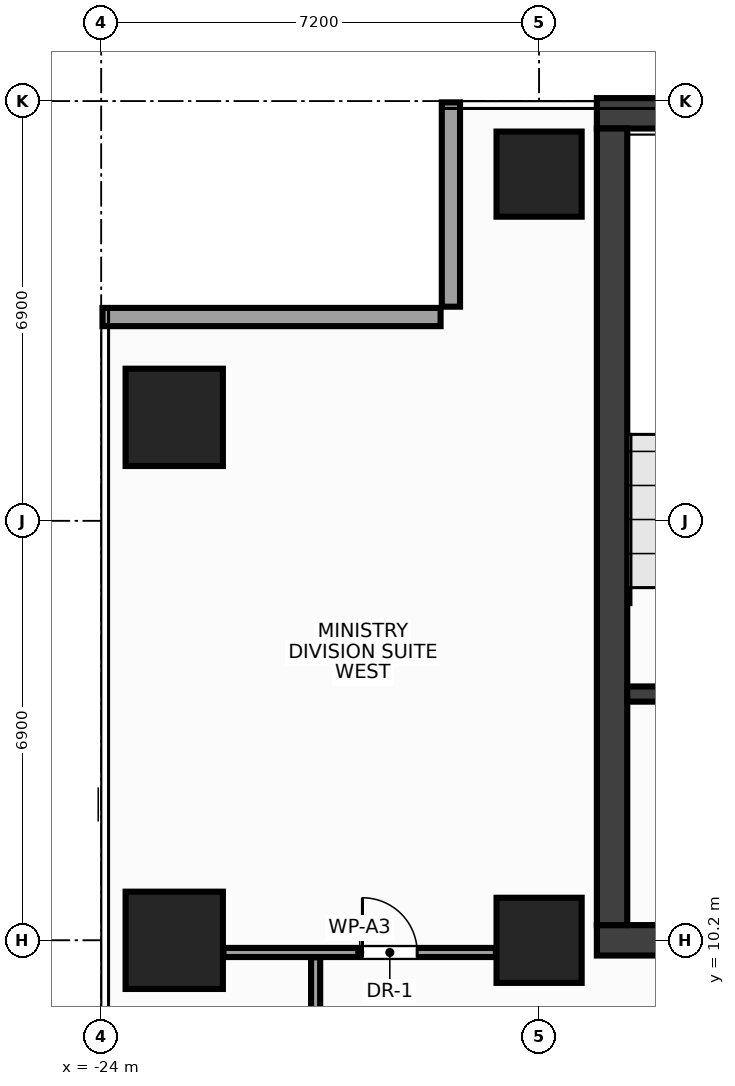
"""IFC4 building model, lengths in metres.
Left out: names, types, materials, properties, quantities, classifications, styles, units other than length and angle.
Written with IfcOpenShell. Run it as: python <this file> out.ifc"""

import sys

from ifc_helpers import new_model, si_unit, direction, frame, frame_2d, origin, origin_2d, place, context, subcontext, project, spatial, rectangle, extrude, source, transform, mapped, element, fill, save


model = new_model("IFC4")
c1 = context("Model", 3, precision=1e-05, world=origin(), true_north=direction((0.0, 1.0)))
c2 = subcontext(c1, "Body", "Model", "MODEL_VIEW")
j1 = project(units=[si_unit("LENGTHUNIT", "METRE"), si_unit("PLANEANGLEUNIT", "RADIAN")], contexts=[c1])
p1 = place(None, origin())
s1 = spatial("IfcSite", under=j1, at=p1, CompositionType="ELEMENT")
p2 = place(p1, origin())
s2 = spatial("IfcBuilding", under=s1, at=p2, CompositionType="ELEMENT")
p3 = place(p2, frame((0.0, 0.0, 214.4)))
s3 = spatial("IfcBuildingStorey", under=s2, at=p3, CompositionType="ELEMENT", Elevation=214.4)
m1 = source(origin(), c2, "Body", "SweptSolid", [
    extrude(rectangle(XDim=31.7, YDim=0.5, at=frame_2d((15.85, 0.0))), origin(), (0.0, 0.0, 1.0), 3.6),
])
p4 = place(p3, frame((-15.85, 23.8, 0.0), z_axis=(0.0, 0.0, 1.0), x_axis=(1.0, 0.0, 0.0)))
e1 = element("IfcWall", 1, at=p4, inside=s3, PredefinedType="SHEAR", context=c2, shape_type="MappedRepresentation", body=[
    mapped(m1, transform((0.0, 0.0, 0.0), x_axis=(1.0, 0.0, 0.0), y_axis=(0.0, 1.0, 0.0), z_axis=(0.0, 0.0, 1.0), scale=1.0)),
])
p5 = place(p3, frame((-15.85, 10.2, 0.0), z_axis=(0.0, 0.0, 1.0), x_axis=(1.0, 0.0, 0.0)))
e2 = element("IfcWall", 2, at=p5, inside=s3, PredefinedType="SHEAR", context=c2, shape_type="MappedRepresentation", body=[
    mapped(m1, transform((0.0, 0.0, 0.0), x_axis=(1.0, 0.0, 0.0), y_axis=(0.0, 1.0, 0.0), z_axis=(0.0, 0.0, 1.0), scale=1.0)),
])
p6 = place(p5, frame((1.7, 0.0, 0.0)))
e3 = element("IfcOpeningElement", 3, at=p6, cuts=e2, PredefinedType="OPENING", context=c2, shape_type="SweptSolid", body=[
    extrude(rectangle(XDim=1.6, YDim=2.15, at=frame_2d((0.8, 1.075))), frame((0.0, 0.262, 0.0), z_axis=(0.0, -1.0, 0.0), x_axis=(1.0, 0.0, 0.0)), (0.0, 0.0, 1.0), 0.524),
])
p7 = place(p5, frame((28.4, 0.0, 0.0)))
e4 = element("IfcOpeningElement", 4, at=p7, cuts=e2, PredefinedType="OPENING", context=c2, shape_type="SweptSolid", body=[
    extrude(rectangle(XDim=1.6, YDim=2.15, at=frame_2d((0.8, 1.075))), frame((0.0, 0.262, 0.0), z_axis=(0.0, -1.0, 0.0), x_axis=(1.0, 0.0, 0.0)), (0.0, 0.0, 1.0), 0.524),
])
p8 = place(p5, frame((15.1, 0.0, 0.0)))
e5 = element("IfcOpeningElement", 5, at=p8, cuts=e2, PredefinedType="OPENING", context=c2, shape_type="SweptSolid", body=[
    extrude(rectangle(XDim=1.5, YDim=2.2, at=frame_2d((0.75, 1.1))), frame((0.0, 0.262, 0.0), z_axis=(0.0, -1.0, 0.0), x_axis=(1.0, 0.0, 0.0)), (0.0, 0.0, 1.0), 0.524),
])
m2 = source(origin(), c2, "Body", "SweptSolid", [
    extrude(rectangle(XDim=13.1, YDim=0.5, at=frame_2d((6.55, 0.0))), origin(), (0.0, 0.0, 1.0), 3.6),
])
p9 = place(p3, frame((-15.6, 10.45, 0.0), z_axis=(0.0, 0.0, 1.0), x_axis=(0.0, 1.0, 0.0)))
e6 = element("IfcWall", 6, at=p9, inside=s3, PredefinedType="SHEAR", context=c2, shape_type="MappedRepresentation", body=[
    mapped(m2, transform((0.0, 0.0, 0.0), x_axis=(1.0, 0.0, 0.0), y_axis=(0.0, 1.0, 0.0), z_axis=(0.0, 0.0, 1.0), scale=1.0)),
])
m3 = source(origin(), c2, "Body", "SweptSolid", [
    extrude(rectangle(XDim=3.705, YDim=0.25, at=frame_2d((1.853, 0.0))), origin(), (0.0, 0.0, 1.0), 3.6),
])
p10 = place(p3, frame((-15.35, 14.25, 0.0), z_axis=(0.0, 0.0, 1.0), x_axis=(1.0, 0.0, 0.0)))
e7 = element("IfcWall", 7, at=p10, inside=s3, PredefinedType="SHEAR", context=c2, shape_type="MappedRepresentation", body=[
    mapped(m3, transform((0.0, 0.0, 0.0), x_axis=(1.0, 0.0, 0.0), y_axis=(0.0, 1.0, 0.0), z_axis=(0.0, 0.0, 1.0), scale=1.0)),
])
p11 = place(p10, frame((0.95, 0.0, 0.0)))
e8 = element("IfcOpeningElement", 8, at=p11, cuts=e7, PredefinedType="OPENING", context=c2, shape_type="SweptSolid", body=[
    extrude(rectangle(XDim=1.6, YDim=2.15, at=frame_2d((0.8, 1.075))), frame((0.0, 0.137, 0.0), z_axis=(0.0, -1.0, 0.0), x_axis=(1.0, 0.0, 0.0)), (0.0, 0.0, 1.0), 0.274),
])
m4 = source(origin(), c2, "Body", "SweptSolid", [
    extrude(rectangle(XDim=1.4, YDim=1.4, at=origin_2d()), origin(), (0.0, 0.0, 1.0), 3.6),
])
for number, where, z_axis, x_axis in (
    (9, (-16.8, 10.2, 0.0), (0.0, 0.0, 1.0), (1.0, 0.0, 0.0)),
    (10, (-16.8, 22.8, 0.0), (0.0, 0.0, 1.0), (1.0, 0.0, 0.0)),
):
    element("IfcColumn", number, at=place(p3, frame(where, z_axis=z_axis, x_axis=x_axis)), inside=s3, PredefinedType="COLUMN", context=c2, shape_type="MappedRepresentation", body=[
        mapped(m4, transform((0.0, 0.0, 0.0), x_axis=(1.0, 0.0, 0.0), y_axis=(0.0, 1.0, 0.0), z_axis=(0.0, 0.0, 1.0), scale=1.0)),
    ])
m5 = source(origin(), c2, "Body", "SweptSolid", [
    extrude(rectangle(XDim=1.6, YDim=1.6, at=origin_2d()), origin(), (0.0, 0.0, 1.0), 3.6),
])
for number, where, z_axis, x_axis in (
    (11, (-22.8, 10.2, 0.0), (0.0, 0.0, 1.0), (1.0, 0.0, 0.0)),
    (12, (-22.8, 18.8, 0.0), (0.0, 0.0, 1.0), (1.0, 0.0, 0.0)),
):
    element("IfcColumn", number, at=place(p3, frame(where, z_axis=z_axis, x_axis=x_axis)), inside=s3, PredefinedType="COLUMN", context=c2, shape_type="MappedRepresentation", body=[
        mapped(m5, transform((0.0, 0.0, 0.0), x_axis=(1.0, 0.0, 0.0), y_axis=(0.0, 1.0, 0.0), z_axis=(0.0, 0.0, 1.0), scale=1.0)),
    ])
m6 = source(origin(), c2, "Body", "SweptSolid", [
    extrude(rectangle(XDim=3.36, YDim=0.3, at=frame_2d((1.68, 0.0))), origin(), (0.0, 0.0, 1.0), 2.76),
])
p12 = place(p3, frame((-18.25, 23.98, 0.0), z_axis=(0.0, 0.0, 1.0), x_axis=(0.0, -1.0, 0.0)))
e13 = element("IfcWall", 13, at=p12, inside=s3, PredefinedType="STANDARD", context=c2, shape_type="MappedRepresentation", body=[
    mapped(m6, transform((0.0, 0.0, 0.0), x_axis=(1.0, 0.0, 0.0), y_axis=(0.0, 1.0, 0.0), z_axis=(0.0, 0.0, 1.0), scale=1.0)),
])
m7 = source(origin(), c2, "Body", "SweptSolid", [
    extrude(rectangle(XDim=5.56, YDim=0.3, at=frame_2d((2.78, 0.0))), origin(), (0.0, 0.0, 1.0), 2.76),
])
p13 = place(p3, frame((-18.42, 20.45, 0.0), z_axis=(0.0, 0.0, 1.0), x_axis=(-1.0, 0.0, 0.0)))
e14 = element("IfcWall", 14, at=p13, inside=s3, PredefinedType="STANDARD", context=c2, shape_type="MappedRepresentation", body=[
    mapped(m7, transform((0.0, 0.0, 0.0), x_axis=(1.0, 0.0, 0.0), y_axis=(0.0, 1.0, 0.0), z_axis=(0.0, 0.0, 1.0), scale=1.0)),
])
m8 = source(origin(), c2, "Body", "SweptSolid", [
    extrude(rectangle(XDim=4.48, YDim=0.15, at=frame_2d((2.24, 0.0))), origin(), (0.0, 0.0, 1.0), 2.915),
])
p14 = place(p3, frame((-21.99, 10.0, 0.0), z_axis=(0.0, 0.0, 1.0), x_axis=(1.0, 0.0, 0.0)))
e15 = element("IfcWall", 15, at=p14, inside=s3, PredefinedType="PARTITIONING", context=c2, shape_type="MappedRepresentation", body=[
    mapped(m8, transform((0.0, 0.0, 0.0), x_axis=(1.0, 0.0, 0.0), y_axis=(0.0, 1.0, 0.0), z_axis=(0.0, 0.0, 1.0), scale=1.0)),
])
p15 = place(p14, frame((2.285, 0.0, 0.0)))
e16 = element("IfcOpeningElement", 16, at=p15, cuts=e15, PredefinedType="OPENING", context=c2, shape_type="SweptSolid", body=[
    extrude(rectangle(XDim=0.9, YDim=2.15, at=frame_2d((0.45, 1.075))), frame((0.0, 0.087, 0.0), z_axis=(0.0, -1.0, 0.0), x_axis=(1.0, 0.0, 0.0)), (0.0, 0.0, 1.0), 0.174),
])
m9 = source(origin(), c2, "Body", "SweptSolid", [
    extrude(rectangle(XDim=2.365, YDim=0.15, at=frame_2d((1.183, 0.0))), origin(), (0.0, 0.0, 1.0), 3.38),
])
p16 = place(p3, frame((-20.475, 7.555, 0.0), z_axis=(0.0, 0.0, 1.0), x_axis=(0.0, 1.0, 0.0)))
e17 = element("IfcWall", 17, at=p16, inside=s3, PredefinedType="PARTITIONING", context=c2, shape_type="MappedRepresentation", body=[
    mapped(m9, transform((0.0, 0.0, 0.0), x_axis=(1.0, 0.0, 0.0), y_axis=(0.0, 1.0, 0.0), z_axis=(0.0, 0.0, 1.0), scale=1.0)),
])
m10 = source(origin(), c2, "Body", "SweptSolid", [
    extrude(rectangle(XDim=0.9, YDim=2.15, at=frame_2d((0.45, 1.075))), frame((0.0, 0.025, 0.0), z_axis=(0.0, -1.0, 0.0), x_axis=(1.0, 0.0, 0.0)), (0.0, 0.0, 1.0), 0.05),
])
p17 = place(p15, origin())
e18 = element("IfcDoor", 18, at=p17, inside=s3, OperationType="SINGLE_SWING_LEFT", PredefinedType="DOOR", context=c2, shape_type="MappedRepresentation", body=[
    mapped(m10, transform((0.0, 0.0, 0.0), x_axis=(1.0, 0.0, 0.0), y_axis=(0.0, 1.0, 0.0), z_axis=(0.0, 0.0, 1.0), scale=1.0)),
])
fill(e16, e18)
save(model, sys.argv[1])
